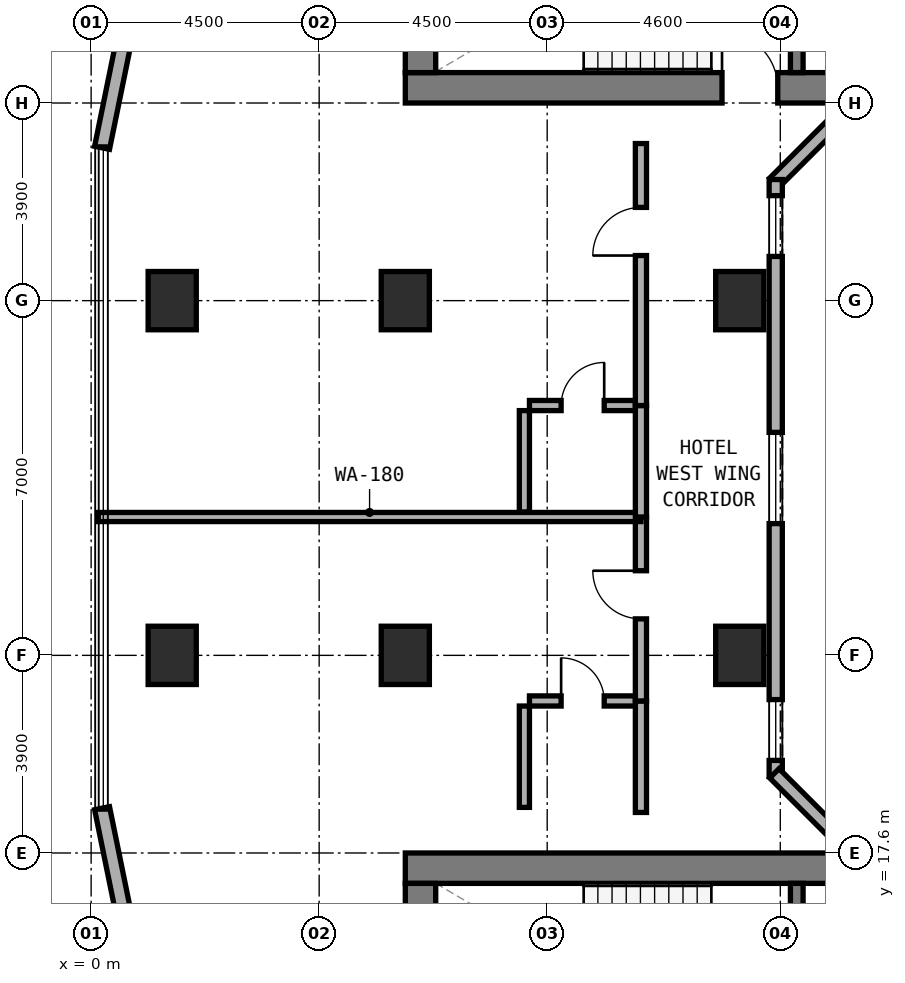
"""IFC4 building model, lengths in metres.
Left out: names, types, materials, properties, quantities, classifications, styles, units other than length and angle.
Written with IfcOpenShell. Run it as: python <this file> out.ifc"""

import sys

from ifc_helpers import new_model, si_unit, direction, frame, frame_2d, origin, origin_2d, place, context, subcontext, project, spatial, rectangle, extrude, element, fill, save


model = new_model("IFC4")
c1 = context("Model", 3, precision=1e-05, world=origin(), true_north=direction((0.0, 1.0)))
c2 = subcontext(c1, "Body", "Model", "MODEL_VIEW")
j1 = project(units=[si_unit("LENGTHUNIT", "METRE"), si_unit("PLANEANGLEUNIT", "RADIAN")], contexts=[c1])
p1 = place(None, origin())
s1 = spatial("IfcSite", under=j1, at=p1, CompositionType="ELEMENT")
p2 = place(p1, origin())
s2 = spatial("IfcBuilding", under=s1, at=p2, CompositionType="ELEMENT")
p3 = place(p2, frame((0.0, 0.0, 27.5)))
s3 = spatial("IfcBuildingStorey", under=s2, at=p3, CompositionType="ELEMENT", Elevation=27.5)
p4 = place(p3, frame((6.2, 32.7, 0.0), z_axis=(0.0, 0.0, 1.0), x_axis=(1.0, 0.0, 0.0)))
e1 = element("IfcWall", 1, at=p4, inside=s3, PredefinedType="SHEAR", context=c2, shape_type="SweptSolid", body=[
    extrude(rectangle(XDim=24.8, YDim=0.6, at=frame_2d((12.4, 0.0))), origin(), (0.0, 0.0, 1.0), 3.5),
])
p5 = place(p4, frame((6.25, 0.0, 0.0)))
e2 = element("IfcOpeningElement", 2, at=p5, cuts=e1, PredefinedType="OPENING", context=c2, shape_type="SweptSolid", body=[
    extrude(rectangle(XDim=1.1, YDim=2.15, at=frame_2d((0.55, 1.075))), frame((0.0, 0.31, 0.0), z_axis=(0.0, -1.0, 0.0), x_axis=(1.0, 0.0, 0.0)), (0.0, 0.0, 1.0), 0.62),
])
p6 = place(p3, frame((6.5, 33.0, 0.0), z_axis=(0.0, 0.0, 1.0), x_axis=(0.0, 1.0, 0.0)))
e3 = element("IfcWall", 3, at=p6, inside=s3, PredefinedType="SHEAR", context=c2, shape_type="SweptSolid", body=[
    extrude(rectangle(XDim=3.16, YDim=0.6, at=frame_2d((1.58, 0.0))), origin(), (0.0, 0.0, 1.0), 3.5),
])
p7 = place(p3, frame((13.925, 33.0, 0.0), z_axis=(0.0, 0.0, 1.0), x_axis=(0.0, 1.0, 0.0)))
e4 = element("IfcWall", 4, at=p7, inside=s3, PredefinedType="STANDARD", context=c2, shape_type="SweptSolid", body=[
    extrude(rectangle(XDim=3.16, YDim=0.25, at=frame_2d((1.58, 0.0))), origin(), (0.0, 0.0, 1.0), 3.22),
])
p8 = place(p7, frame((0.98, 0.0, 0.0)))
e5 = element("IfcOpeningElement", 5, at=p8, cuts=e4, PredefinedType="OPENING", context=c2, shape_type="SweptSolid", body=[
    extrude(rectangle(XDim=1.1, YDim=2.15, at=frame_2d((0.55, 1.075))), frame((0.0, 0.135, 0.0), z_axis=(0.0, -1.0, 0.0), x_axis=(1.0, 0.0, 0.0)), (0.0, 0.0, 1.0), 0.27),
])
p9 = place(p3, frame((6.2, 17.3, 0.0), z_axis=(0.0, 0.0, 1.0), x_axis=(1.0, 0.0, 0.0)))
e6 = element("IfcWall", 6, at=p9, inside=s3, PredefinedType="SHEAR", context=c2, shape_type="SweptSolid", body=[
    extrude(rectangle(XDim=24.8, YDim=0.6, at=frame_2d((12.4, 0.0))), origin(), (0.0, 0.0, 1.0), 3.5),
])
p10 = place(p3, frame((6.5, 13.84, 0.0), z_axis=(0.0, 0.0, 1.0), x_axis=(0.0, 1.0, 0.0)))
e7 = element("IfcWall", 7, at=p10, inside=s3, PredefinedType="SHEAR", context=c2, shape_type="SweptSolid", body=[
    extrude(rectangle(XDim=3.16, YDim=0.6, at=frame_2d((1.58, 0.0))), origin(), (0.0, 0.0, 1.0), 3.5),
])
p11 = place(p3, frame((13.925, 13.84, 0.0), z_axis=(0.0, 0.0, 1.0), x_axis=(0.0, 1.0, 0.0)))
e8 = element("IfcWall", 8, at=p11, inside=s3, PredefinedType="STANDARD", context=c2, shape_type="SweptSolid", body=[
    extrude(rectangle(XDim=3.16, YDim=0.25, at=frame_2d((1.58, 0.0))), origin(), (0.0, 0.0, 1.0), 3.22),
])
p12 = place(p11, frame((0.98, 0.0, 0.0)))
e9 = element("IfcOpeningElement", 9, at=p12, cuts=e8, PredefinedType="OPENING", context=c2, shape_type="SweptSolid", body=[
    extrude(rectangle(XDim=1.1, YDim=2.15, at=frame_2d((0.55, 1.075))), frame((0.0, 0.135, 0.0), z_axis=(0.0, -1.0, 0.0), x_axis=(1.0, 0.0, 0.0)), (0.0, 0.0, 1.0), 0.27),
])
for number, where, z_axis, x_axis in (
    (10, (6.2, 21.5, 0.0), (0.0, 0.0, 1.0), (1.0, 0.0, 0.0)),
    (11, (6.2, 28.5, 0.0), (0.0, 0.0, 1.0), (1.0, 0.0, 0.0)),
    (12, (12.8, 21.5, 0.0), (0.0, 0.0, 1.0), (1.0, 0.0, 0.0)),
    (13, (12.8, 28.5, 0.0), (0.0, 0.0, 1.0), (1.0, 0.0, 0.0)),
    (14, (1.6, 21.5, 0.0), (0.0, 0.0, 1.0), (1.0, 0.0, 0.0)),
    (15, (1.6, 28.5, 0.0), (0.0, 0.0, 1.0), (1.0, 0.0, 0.0)),
):
    element("IfcColumn", number, at=place(p3, frame(where, z_axis=z_axis, x_axis=x_axis)), inside=s3, PredefinedType="COLUMN", context=c2, shape_type="SweptSolid", body=[
        extrude(rectangle(XDim=0.95, YDim=1.15, at=origin_2d()), origin(), (0.0, 0.0, 1.0), 3.5),
    ])
p13 = place(p3, frame((2.229, 41.378, 0.0), z_axis=(0.0, 0.0, 1.0), x_axis=(-0.199990901713, -0.979797754249, 0.0)))
e16 = element("IfcWall", 16, at=p13, inside=s3, PredefinedType="STANDARD", context=c2, shape_type="SweptSolid", body=[
    extrude(rectangle(XDim=10.065, YDim=0.3, at=frame_2d((5.033, 0.0))), origin(), (0.0, 0.0, 1.0), 3.22),
])
p14 = place(p13, frame((0.378, 0.0, 0.85)))
e17 = element("IfcOpeningElement", 17, at=p14, cuts=e16, PredefinedType="OPENING", context=c2, shape_type="SweptSolid", body=[
    extrude(rectangle(XDim=1.8, YDim=1.5, at=frame_2d((0.9, 0.75))), frame((0.0, 0.16, 0.0), z_axis=(0.0, -1.0, 0.0), x_axis=(1.0, 0.0, 0.0)), (0.0, 0.0, 1.0), 0.32),
])
p15 = place(p13, frame((5.236, 0.0, 0.8)))
e18 = element("IfcOpeningElement", 18, at=p15, cuts=e16, PredefinedType="OPENING", context=c2, shape_type="SweptSolid", body=[
    extrude(rectangle(XDim=2.4, YDim=1.6, at=frame_2d((1.2, 0.8))), frame((0.0, 0.16, 0.0), z_axis=(0.0, -1.0, 0.0), x_axis=(1.0, 0.0, 0.0)), (0.0, 0.0, 1.0), 0.32),
])
p16 = place(p3, frame((0.216, 18.484, 0.0), z_axis=(0.0, 0.0, 1.0), x_axis=(0.199990901713, -0.979797754249, 0.0)))
e19 = element("IfcWall", 19, at=p16, inside=s3, PredefinedType="STANDARD", context=c2, shape_type="SweptSolid", body=[
    extrude(rectangle(XDim=10.065, YDim=0.3, at=frame_2d((5.033, 0.0))), origin(), (0.0, 0.0, 1.0), 3.22),
])
p17 = place(p16, frame((2.429, 0.0, 0.8)))
e20 = element("IfcOpeningElement", 20, at=p17, cuts=e19, PredefinedType="OPENING", context=c2, shape_type="SweptSolid", body=[
    extrude(rectangle(XDim=2.4, YDim=1.6, at=frame_2d((1.2, 0.8))), frame((0.0, 0.16, 0.0), z_axis=(0.0, -1.0, 0.0), x_axis=(1.0, 0.0, 0.0)), (0.0, 0.0, 1.0), 0.32),
])
p18 = place(p16, frame((7.887, 0.0, 0.85)))
e21 = element("IfcOpeningElement", 21, at=p18, cuts=e19, PredefinedType="OPENING", context=c2, shape_type="SweptSolid", body=[
    extrude(rectangle(XDim=1.8, YDim=1.5, at=frame_2d((0.9, 0.75))), frame((0.0, 0.16, 0.0), z_axis=(0.0, -1.0, 0.0), x_axis=(1.0, 0.0, 0.0)), (0.0, 0.0, 1.0), 0.32),
])
p19 = place(p3, frame((15.318, 32.662, 0.0), z_axis=(0.0, 0.0, 1.0), x_axis=(-0.707106781187, -0.707106781187, 0.0)))
e22 = element("IfcWall", 22, at=p19, inside=s3, PredefinedType="STANDARD", context=c2, shape_type="SweptSolid", body=[
    extrude(rectangle(XDim=2.594, YDim=0.26, at=frame_2d((1.297, 0.0))), origin(), (0.0, 0.0, 1.0), 3.22),
])
p20 = place(p3, frame((13.51, 30.89, 0.0), z_axis=(0.0, 0.0, 1.0), x_axis=(0.0, -1.0, 0.0)))
e23 = element("IfcWall", 23, at=p20, inside=s3, PredefinedType="STANDARD", context=c2, shape_type="SweptSolid", body=[
    extrude(rectangle(XDim=11.78, YDim=0.26, at=frame_2d((5.89, 0.0))), origin(), (0.0, 0.0, 1.0), 3.22),
])
p21 = place(p20, frame((0.318, 0.0, 0.85)))
e24 = element("IfcOpeningElement", 24, at=p21, cuts=e23, PredefinedType="OPENING", context=c2, shape_type="SweptSolid", body=[
    extrude(rectangle(XDim=1.2, YDim=1.5, at=frame_2d((0.6, 0.75))), frame((0.0, 0.14, 0.0), z_axis=(0.0, -1.0, 0.0), x_axis=(1.0, 0.0, 0.0)), (0.0, 0.0, 1.0), 0.28),
])
p22 = place(p20, frame((4.99, 0.0, 0.85)))
e25 = element("IfcOpeningElement", 25, at=p22, cuts=e23, PredefinedType="OPENING", context=c2, shape_type="SweptSolid", body=[
    extrude(rectangle(XDim=1.8, YDim=1.5, at=frame_2d((0.9, 0.75))), frame((0.0, 0.14, 0.0), z_axis=(0.0, -1.0, 0.0), x_axis=(1.0, 0.0, 0.0)), (0.0, 0.0, 1.0), 0.28),
])
p23 = place(p20, frame((10.263, 0.0, 0.85)))
e26 = element("IfcOpeningElement", 26, at=p23, cuts=e23, PredefinedType="OPENING", context=c2, shape_type="SweptSolid", body=[
    extrude(rectangle(XDim=1.2, YDim=1.5, at=frame_2d((0.6, 0.75))), frame((0.0, 0.14, 0.0), z_axis=(0.0, -1.0, 0.0), x_axis=(1.0, 0.0, 0.0)), (0.0, 0.0, 1.0), 0.28),
])
p24 = place(p3, frame((13.484, 19.172, 0.0), z_axis=(0.0, 0.0, 1.0), x_axis=(0.707106781187, -0.707106781187, 0.0)))
e27 = element("IfcWall", 27, at=p24, inside=s3, PredefinedType="STANDARD", context=c2, shape_type="SweptSolid", body=[
    extrude(rectangle(XDim=2.594, YDim=0.26, at=frame_2d((1.297, 0.0))), origin(), (0.0, 0.0, 1.0), 3.22),
])
p25 = place(p3, frame((8.65, 20.6, 0.0), z_axis=(0.0, 0.0, 1.0), x_axis=(1.0, 0.0, 0.0)))
e28 = element("IfcWall", 28, at=p25, inside=s3, PredefinedType="PLUMBINGWALL", context=c2, shape_type="SweptSolid", body=[
    extrude(rectangle(XDim=2.1, YDim=0.2, at=frame_2d((1.05, 0.0))), origin(), (0.0, 0.0, 1.0), 3.22),
])
p26 = place(p25, frame((0.625, 0.0, 0.0)))
e29 = element("IfcOpeningElement", 29, at=p26, cuts=e28, PredefinedType="OPENING", context=c2, shape_type="SweptSolid", body=[
    extrude(rectangle(XDim=0.85, YDim=2.1, at=frame_2d((0.425, 1.05))), frame((0.0, 0.11, 0.0), z_axis=(0.0, -1.0, 0.0), x_axis=(1.0, 0.0, 0.0)), (0.0, 0.0, 1.0), 0.22),
])
p27 = place(p3, frame((8.55, 18.5, 0.0), z_axis=(0.0, 0.0, 1.0), x_axis=(0.0, 1.0, 0.0)))
e30 = element("IfcWall", 30, at=p27, inside=s3, PredefinedType="PLUMBINGWALL", context=c2, shape_type="SweptSolid", body=[
    extrude(rectangle(XDim=2.0, YDim=0.2, at=frame_2d((1.0, 0.0))), origin(), (0.0, 0.0, 1.0), 3.22),
])
p28 = place(p3, frame((10.85, 18.4, 0.0), z_axis=(0.0, 0.0, 1.0), x_axis=(0.0, 1.0, 0.0)))
e31 = element("IfcWall", 31, at=p28, inside=s3, PredefinedType="SOLIDWALL", context=c2, shape_type="SweptSolid", body=[
    extrude(rectangle(XDim=2.2, YDim=0.22, at=frame_2d((1.1, 0.0))), origin(), (0.0, 0.0, 1.0), 3.22),
])
p29 = place(p3, frame((10.85, 20.6, 0.0), z_axis=(0.0, 0.0, 1.0), x_axis=(0.0, 1.0, 0.0)))
e32 = element("IfcWall", 32, at=p29, inside=s3, PredefinedType="SOLIDWALL", context=c2, shape_type="SweptSolid", body=[
    extrude(rectangle(XDim=3.63, YDim=0.22, at=frame_2d((1.815, 0.0))), origin(), (0.0, 0.0, 1.0), 2.395),
])
p30 = place(p29, frame((1.62, 0.0, 0.0)))
e33 = element("IfcOpeningElement", 33, at=p30, cuts=e32, PredefinedType="OPENING", context=c2, shape_type="SweptSolid", body=[
    extrude(rectangle(XDim=0.95, YDim=2.1, at=frame_2d((0.475, 1.05))), frame((0.0, 0.12, 0.0), z_axis=(0.0, -1.0, 0.0), x_axis=(1.0, 0.0, 0.0)), (0.0, 0.0, 1.0), 0.24),
])
p31 = place(p3, frame((0.14, 24.23, 0.0), z_axis=(0.0, 0.0, 1.0), x_axis=(1.0, 0.0, 0.0)))
e34 = element("IfcWall", 34, at=p31, inside=s3, PredefinedType="SOLIDWALL", context=c2, shape_type="SweptSolid", body=[
    extrude(rectangle(XDim=10.71, YDim=0.18, at=frame_2d((5.355, 0.0))), origin(), (0.0, 0.0, 1.0), 2.745),
])
p32 = place(p3, frame((8.65, 26.43, 0.0), z_axis=(0.0, 0.0, 1.0), x_axis=(1.0, 0.0, 0.0)))
e35 = element("IfcWall", 35, at=p32, inside=s3, PredefinedType="PLUMBINGWALL", context=c2, shape_type="SweptSolid", body=[
    extrude(rectangle(XDim=2.1, YDim=0.2, at=frame_2d((1.05, 0.0))), origin(), (0.0, 0.0, 1.0), 3.22),
])
p33 = place(p32, frame((0.625, 0.0, 0.0)))
e36 = element("IfcOpeningElement", 36, at=p33, cuts=e35, PredefinedType="OPENING", context=c2, shape_type="SweptSolid", body=[
    extrude(rectangle(XDim=0.85, YDim=2.1, at=frame_2d((0.425, 1.05))), frame((0.0, 0.11, 0.0), z_axis=(0.0, -1.0, 0.0), x_axis=(1.0, 0.0, 0.0)), (0.0, 0.0, 1.0), 0.22),
])
p34 = place(p3, frame((8.55, 24.33, 0.0), z_axis=(0.0, 0.0, 1.0), x_axis=(0.0, 1.0, 0.0)))
e37 = element("IfcWall", 37, at=p34, inside=s3, PredefinedType="PLUMBINGWALL", context=c2, shape_type="SweptSolid", body=[
    extrude(rectangle(XDim=2.0, YDim=0.2, at=frame_2d((1.0, 0.0))), origin(), (0.0, 0.0, 1.0), 3.22),
])
p35 = place(p3, frame((10.85, 24.23, 0.0), z_axis=(0.0, 0.0, 1.0), x_axis=(0.0, 1.0, 0.0)))
e38 = element("IfcWall", 38, at=p35, inside=s3, PredefinedType="SOLIDWALL", context=c2, shape_type="SweptSolid", body=[
    extrude(rectangle(XDim=2.2, YDim=0.22, at=frame_2d((1.1, 0.0))), origin(), (0.0, 0.0, 1.0), 3.22),
])
p36 = place(p3, frame((10.85, 26.43, 0.0), z_axis=(0.0, 0.0, 1.0), x_axis=(0.0, 1.0, 0.0)))
e39 = element("IfcWall", 39, at=p36, inside=s3, PredefinedType="SOLIDWALL", context=c2, shape_type="SweptSolid", body=[
    extrude(rectangle(XDim=5.17, YDim=0.22, at=frame_2d((2.585, 0.0))), origin(), (0.0, 0.0, 1.0), 2.395),
])
p37 = place(p36, frame((2.96, 0.0, 0.0)))
e40 = element("IfcOpeningElement", 40, at=p37, cuts=e39, PredefinedType="OPENING", context=c2, shape_type="SweptSolid", body=[
    extrude(rectangle(XDim=0.95, YDim=2.1, at=frame_2d((0.475, 1.05))), frame((0.0, 0.12, 0.0), z_axis=(0.0, -1.0, 0.0), x_axis=(1.0, 0.0, 0.0)), (0.0, 0.0, 1.0), 0.24),
])
p38 = place(p21, origin())
e41 = element("IfcWindow", 41, at=p38, inside=s3, PartitioningType="SINGLE_PANEL", PredefinedType="WINDOW", context=c2, shape_type="SweptSolid", body=[
    extrude(rectangle(XDim=1.2, YDim=1.5, at=frame_2d((0.6, 0.75))), frame((0.0, 0.03, 0.0), z_axis=(0.0, -1.0, 0.0), x_axis=(1.0, 0.0, 0.0)), (0.0, 0.0, 1.0), 0.06),
])
fill(e24, e41)
p39 = place(p22, origin())
e42 = element("IfcWindow", 42, at=p39, inside=s3, PartitioningType="SINGLE_PANEL", PredefinedType="WINDOW", context=c2, shape_type="SweptSolid", body=[
    extrude(rectangle(XDim=1.8, YDim=1.5, at=frame_2d((0.9, 0.75))), frame((0.0, 0.03, 0.0), z_axis=(0.0, -1.0, 0.0), x_axis=(1.0, 0.0, 0.0)), (0.0, 0.0, 1.0), 0.06),
])
fill(e25, e42)
p40 = place(p23, origin())
e43 = element("IfcWindow", 43, at=p40, inside=s3, PartitioningType="SINGLE_PANEL", PredefinedType="WINDOW", context=c2, shape_type="SweptSolid", body=[
    extrude(rectangle(XDim=1.2, YDim=1.5, at=frame_2d((0.6, 0.75))), frame((0.0, 0.03, 0.0), z_axis=(0.0, -1.0, 0.0), x_axis=(1.0, 0.0, 0.0)), (0.0, 0.0, 1.0), 0.06),
])
fill(e26, e43)
p41 = place(p5, origin())
e44 = element("IfcDoor", 44, at=p41, inside=s3, OperationType="SINGLE_SWING_LEFT", PredefinedType="DOOR", context=c2, shape_type="SweptSolid", body=[
    extrude(rectangle(XDim=1.1, YDim=2.15, at=frame_2d((0.55, 1.075))), frame((0.0, 0.025, 0.0), z_axis=(0.0, -1.0, 0.0), x_axis=(1.0, 0.0, 0.0)), (0.0, 0.0, 1.0), 0.05),
])
fill(e2, e44)
p42 = place(p26, origin())
e45 = element("IfcDoor", 45, at=p42, inside=s3, OperationType="SINGLE_SWING_LEFT", PredefinedType="DOOR", context=c2, shape_type="SweptSolid", body=[
    extrude(rectangle(XDim=0.85, YDim=2.1, at=frame_2d((0.425, 1.05))), frame((0.0, 0.025, 0.0), z_axis=(0.0, -1.0, 0.0), x_axis=(1.0, 0.0, 0.0)), (0.0, 0.0, 1.0), 0.05),
])
fill(e29, e45)
p43 = place(p30, origin())
e46 = element("IfcDoor", 46, at=p43, inside=s3, OperationType="SINGLE_SWING_RIGHT", PredefinedType="DOOR", context=c2, shape_type="SweptSolid", body=[
    extrude(rectangle(XDim=0.95, YDim=2.1, at=frame_2d((0.475, 1.05))), frame((0.0, 0.025, 0.0), z_axis=(0.0, -1.0, 0.0), x_axis=(1.0, 0.0, 0.0)), (0.0, 0.0, 1.0), 0.05),
])
fill(e33, e46)
p44 = place(p33, origin())
e47 = element("IfcDoor", 47, at=p44, inside=s3, OperationType="SINGLE_SWING_RIGHT", PredefinedType="DOOR", context=c2, shape_type="SweptSolid", body=[
    extrude(rectangle(XDim=0.85, YDim=2.1, at=frame_2d((0.425, 1.05))), frame((0.0, 0.025, 0.0), z_axis=(0.0, -1.0, 0.0), x_axis=(1.0, 0.0, 0.0)), (0.0, 0.0, 1.0), 0.05),
])
fill(e36, e47)
p45 = place(p37, origin())
e48 = element("IfcDoor", 48, at=p45, inside=s3, OperationType="SINGLE_SWING_LEFT", PredefinedType="DOOR", context=c2, shape_type="SweptSolid", body=[
    extrude(rectangle(XDim=0.95, YDim=2.1, at=frame_2d((0.475, 1.05))), frame((0.0, 0.025, 0.0), z_axis=(0.0, -1.0, 0.0), x_axis=(1.0, 0.0, 0.0)), (0.0, 0.0, 1.0), 0.05),
])
fill(e40, e48)
save(model, sys.argv[1])
